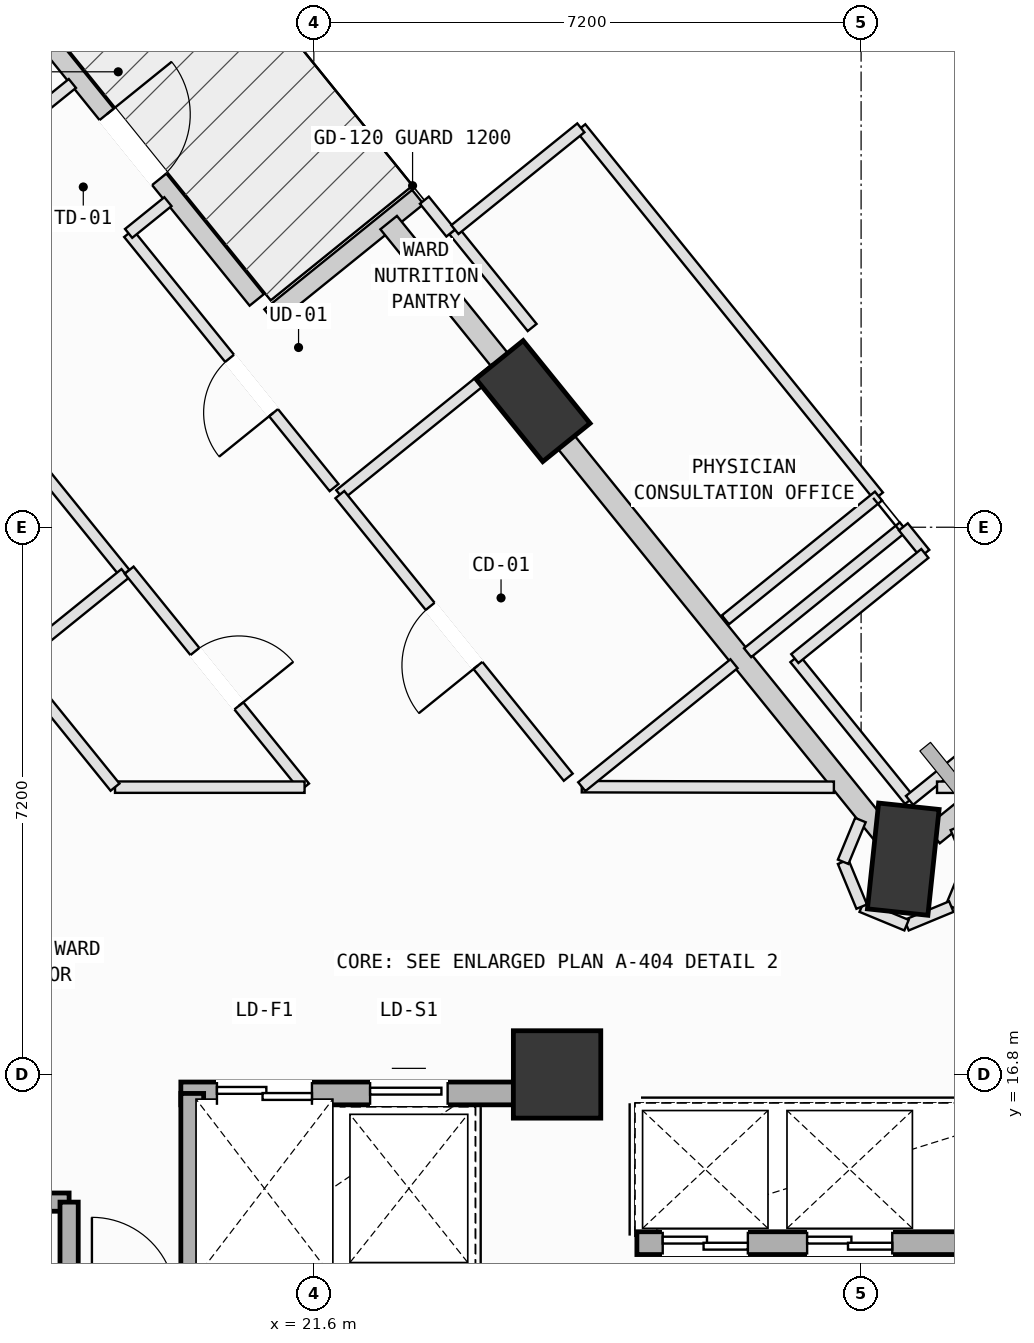
"""IFC4 building model, lengths in metres.
Left out: names, types, materials, properties, quantities, classifications, styles, units other than length and angle.
Written with IfcOpenShell. Run it as: python <this file> out.ifc"""

import sys

from ifc_helpers import new_model, si_unit, direction, frame, frame_2d, origin, origin_2d, place, context, subcontext, project, spatial, rectangle, extrude, element, fill, save


model = new_model("IFC4")
c1 = context("Model", 3, precision=1e-05, world=origin(), true_north=direction((0.0, 1.0)))
c2 = subcontext(c1, "Body", "Model", "MODEL_VIEW")
j1 = project(units=[si_unit("LENGTHUNIT", "METRE"), si_unit("PLANEANGLEUNIT", "RADIAN")], contexts=[c1])
p1 = place(None, origin())
s1 = spatial("IfcSite", under=j1, at=p1, CompositionType="ELEMENT")
p2 = place(p1, origin())
s2 = spatial("IfcBuilding", under=s1, at=p2, CompositionType="ELEMENT")
p3 = place(p2, frame((0.0, 0.0, 189.8)))
s3 = spatial("IfcBuildingStorey", under=s2, at=p3, CompositionType="ELEMENT", Elevation=189.8)
p4 = place(p3, frame((24.8, 16.8, 0.0), z_axis=(0.0, 0.0, 1.0), x_axis=(1.0, 0.0, 0.0)))
e1 = element("IfcColumn", 1, at=p4, inside=s3, PredefinedType="COLUMN", context=c2, shape_type="SweptSolid", body=[
    extrude(rectangle(XDim=1.15, YDim=1.15, at=origin_2d()), origin(), (0.0, 0.0, 1.0), 4.0),
])
p5 = place(p3, frame((29.355, 19.633, 0.002), z_axis=(0.021556852315, -0.017465325105, 0.999615058179), x_axis=(-0.70601495746, 0.707659307079, 0.027589580415)))
e2 = element("IfcColumn", 2, at=p5, inside=s3, PredefinedType="COLUMN", context=c2, shape_type="SweptSolid", body=[
    extrude(rectangle(XDim=1.4, YDim=0.8, at=origin_2d()), origin(), (0.0, 0.0, 1.0), 3.998),
])
p6 = place(p3, frame((24.483, 25.66, 0.002), z_axis=(-0.003235498094, -0.037788175848, 0.999280533843), x_axis=(-0.560052946026, 0.827931598079, 0.029495195374)))
e3 = element("IfcColumn", 3, at=p6, inside=s3, PredefinedType="COLUMN", context=c2, shape_type="SweptSolid", body=[
    extrude(rectangle(XDim=1.4, YDim=0.8, at=origin_2d()), origin(), (0.0, 0.0, 1.0), 3.999),
])
p7 = place(p3, frame((16.473, 32.403, 0.0), z_axis=(0.0, 0.0, 1.0), x_axis=(0.628648132711, -0.777689864431, 0.0)))
e4 = element("IfcWall", 4, at=p7, inside=s3, PredefinedType="SOLIDWALL", context=c2, shape_type="SweptSolid", body=[
    extrude(rectangle(XDim=6.96, YDim=0.24, at=frame_2d((3.48, 0.0))), origin(), (0.0, 0.0, 1.0), 3.265),
])
p8 = place(p7, frame((3.82, 0.0, 0.0)))
e5 = element("IfcOpeningElement", 5, at=p8, cuts=e4, PredefinedType="OPENING", context=c2, shape_type="SweptSolid", body=[
    extrude(rectangle(XDim=1.1, YDim=2.15, at=frame_2d((0.55, 1.075))), frame((0.0, 0.13, 0.0), z_axis=(0.0, -1.0, 0.0), x_axis=(1.0, 0.0, 0.0)), (0.0, 0.0, 1.0), 0.26),
])
p9 = place(p3, frame((21.024, 26.773, 0.0), z_axis=(0.0, 0.0, 1.0), x_axis=(0.777638153774, 0.628712097701, 0.0)))
e6 = element("IfcWall", 6, at=p9, inside=s3, PredefinedType="SOLIDWALL", context=c2, shape_type="SweptSolid", body=[
    extrude(rectangle(XDim=2.5, YDim=0.24, at=frame_2d((1.25, 0.0))), origin(), (0.0, 0.0, 1.0), 3.265),
])
p10 = place(p3, frame((29.747, 19.95, 0.0), z_axis=(0.0, 0.0, 1.0), x_axis=(0.777717798176, 0.628613574782, 0.0)))
e7 = element("IfcWall", 7, at=p10, inside=s3, PredefinedType="SOLIDWALL", context=c2, shape_type="SweptSolid", body=[
    extrude(rectangle(XDim=5.96, YDim=0.28, at=frame_2d((2.98, 0.0))), origin(), (0.0, 0.0, 1.0), 3.265),
])
p11 = place(p3, frame((29.077, 19.976, 0.0), z_axis=(0.0, 0.0, 1.0), x_axis=(-0.628642221387, 0.777694642832, 0.0)))
e8 = element("IfcWall", 8, at=p11, inside=s3, PredefinedType="SOLIDWALL", context=c2, shape_type="SweptSolid", body=[
    extrude(rectangle(XDim=6.76, YDim=0.28, at=frame_2d((3.38, 0.0))), origin(), (0.0, 0.0, 1.0), 3.265),
])
p12 = place(p3, frame((24.207, 26.001, 0.0), z_axis=(0.0, 0.0, 1.0), x_axis=(-0.628643052837, 0.777693970736, 0.0)))
e9 = element("IfcWall", 9, at=p12, inside=s3, PredefinedType="SOLIDWALL", context=c2, shape_type="SweptSolid", body=[
    extrude(rectangle(XDim=2.582, YDim=0.28, at=frame_2d((1.291, 0.0))), origin(), (0.0, 0.0, 1.0), 3.245),
])
p13 = place(p3, frame((14.92, 15.12, 0.0), z_axis=(0.0, 0.0, 1.0), x_axis=(1.0, 0.0, 0.0)))
e10 = element("IfcWall", 10, at=p13, inside=s3, PredefinedType="SOLIDWALL", context=c2, shape_type="SweptSolid", body=[
    extrude(rectangle(XDim=3.46, YDim=0.24, at=frame_2d((1.73, 0.0))), origin(), (0.0, 0.0, 1.0), 3.78),
])
p14 = place(p13, frame((0.22, 0.0, 0.0)))
e11 = element("IfcOpeningElement", 11, at=p14, cuts=e10, PredefinedType="OPENING", context=c2, shape_type="SweptSolid", body=[
    extrude(rectangle(XDim=1.1, YDim=2.15, at=frame_2d((0.55, 1.075))), frame((0.0, 0.13, 0.0), z_axis=(0.0, -1.0, 0.0), x_axis=(1.0, 0.0, 0.0)), (0.0, 0.0, 1.0), 0.26),
])
p15 = place(p3, frame((18.38, 15.12, 0.0), z_axis=(0.0, 0.0, 1.0), x_axis=(0.0, -1.0, 0.0)))
e12 = element("IfcWall", 12, at=p15, inside=s3, PredefinedType="SOLIDWALL", context=c2, shape_type="SweptSolid", body=[
    extrude(rectangle(XDim=7.045, YDim=0.24, at=frame_2d((3.522, 0.0))), origin(), (0.0, 0.0, 1.0), 3.78),
])
p16 = place(p3, frame((19.85, 16.55, 0.0), z_axis=(0.0, 0.0, 1.0), x_axis=(1.0, 0.0, 0.0)))
e13 = element("IfcWall", 13, at=p16, inside=s3, PredefinedType="SOLIDWALL", context=c2, shape_type="SweptSolid", body=[
    extrude(rectangle(XDim=4.375, YDim=0.3, at=frame_2d((2.188, 0.0))), origin(), (0.0, 0.0, 1.0), 3.78),
])
p17 = place(p16, frame((0.475, 0.0, 0.0)))
e14 = element("IfcOpeningElement", 14, at=p17, cuts=e13, PredefinedType="OPENING", context=c2, shape_type="SweptSolid", body=[
    extrude(rectangle(XDim=1.25, YDim=2.18, at=frame_2d((0.625, 1.09))), frame((0.0, 0.16, 0.0), z_axis=(0.0, -1.0, 0.0), x_axis=(1.0, 0.0, 0.0)), (0.0, 0.0, 1.0), 0.32),
])
p18 = place(p16, frame((2.49, 0.0, 0.0)))
e15 = element("IfcOpeningElement", 15, at=p18, cuts=e13, PredefinedType="OPENING", context=c2, shape_type="SweptSolid", body=[
    extrude(rectangle(XDim=1.02, YDim=2.12, at=frame_2d((0.51, 1.06))), frame((0.0, 0.16, 0.0), z_axis=(0.0, -1.0, 0.0), x_axis=(1.0, 0.0, 0.0)), (0.0, 0.0, 1.0), 0.32),
])
p19 = place(p3, frame((20.0, 13.82, 0.0), z_axis=(0.0, 0.0, 1.0), x_axis=(0.0, 1.0, 0.0)))
e16 = element("IfcWall", 16, at=p19, inside=s3, PredefinedType="SOLIDWALL", context=c2, shape_type="SweptSolid", body=[
    extrude(rectangle(XDim=2.73, YDim=0.3, at=frame_2d((1.365, 0.0))), origin(), (0.0, 0.0, 1.0), 3.78),
])
p20 = place(p3, frame((25.85, 14.58, 0.0), z_axis=(0.0, 0.0, 1.0), x_axis=(1.0, 0.0, 0.0)))
e17 = element("IfcWall", 17, at=p20, inside=s3, PredefinedType="SOLIDWALL", context=c2, shape_type="SweptSolid", body=[
    extrude(rectangle(XDim=5.45, YDim=0.3, at=frame_2d((2.725, 0.0))), origin(), (0.0, 0.0, 1.0), 3.78),
])
p21 = place(p20, frame((0.34, 0.0, 0.0)))
e18 = element("IfcOpeningElement", 18, at=p21, cuts=e17, PredefinedType="OPENING", context=c2, shape_type="SweptSolid", body=[
    extrude(rectangle(XDim=1.12, YDim=2.15, at=frame_2d((0.56, 1.075))), frame((0.0, 0.16, 0.0), z_axis=(0.0, -1.0, 0.0), x_axis=(1.0, 0.0, 0.0)), (0.0, 0.0, 1.0), 0.32),
])
p22 = place(p20, frame((2.24, 0.0, 0.0)))
e19 = element("IfcOpeningElement", 19, at=p22, cuts=e17, PredefinedType="OPENING", context=c2, shape_type="SweptSolid", body=[
    extrude(rectangle(XDim=1.12, YDim=2.15, at=frame_2d((0.56, 1.075))), frame((0.0, 0.16, 0.0), z_axis=(0.0, -1.0, 0.0), x_axis=(1.0, 0.0, 0.0)), (0.0, 0.0, 1.0), 0.32),
])
p23 = place(p3, frame((14.061, 29.644, 0.0), z_axis=(0.0, 0.0, 1.0), x_axis=(0.628674878408, -0.777668243699, 0.0)))
e20 = element("IfcWall", 20, at=p23, inside=s3, PredefinedType="PARTITIONING", context=c2, shape_type="SweptSolid", body=[
    extrude(rectangle(XDim=8.041, YDim=0.15, at=frame_2d((4.02, 0.0))), origin(), (0.0, 0.0, 1.0), 3.78),
])
p24 = place(p23, frame((3.42, 0.0, 0.0)))
e21 = element("IfcOpeningElement", 21, at=p24, cuts=e20, PredefinedType="OPENING", context=c2, shape_type="SweptSolid", body=[
    extrude(rectangle(XDim=1.2, YDim=2.15, at=frame_2d((0.6, 1.075))), frame((0.0, 0.085, 0.0), z_axis=(0.0, -1.0, 0.0), x_axis=(1.0, 0.0, 0.0)), (0.0, 0.0, 1.0), 0.17),
])
p25 = place(p3, frame((19.116, 23.391, 0.0), z_axis=(0.0, 0.0, 1.0), x_axis=(-0.777737917083, -0.628588682949, 0.0)))
e22 = element("IfcWall", 22, at=p25, inside=s3, PredefinedType="PARTITIONING", context=c2, shape_type="SweptSolid", body=[
    extrude(rectangle(XDim=4.472, YDim=0.15, at=frame_2d((2.236, 0.0))), origin(), (0.0, 0.0, 1.0), 3.78),
])
p26 = place(p3, frame((27.928, 22.272, 0.0), z_axis=(0.0, 0.0, 1.0), x_axis=(0.628817696096, -0.777552766747, 0.0)))
e23 = element("IfcWall", 23, at=p26, inside=s3, PredefinedType="PARTITIONING", context=c2, shape_type="SweptSolid", body=[
    extrude(rectangle(XDim=2.4, YDim=0.15, at=frame_2d((1.2, 0.0))), origin(), (0.0, 0.0, 1.0), 3.78),
])
p27 = place(p3, frame((29.437, 20.406, 0.0), z_axis=(0.0, 0.0, 1.0), x_axis=(0.777692568026, 0.628644788125, 0.0)))
e24 = element("IfcWall", 24, at=p27, inside=s3, PredefinedType="PARTITIONING", context=c2, shape_type="SweptSolid", body=[
    extrude(rectangle(XDim=6.944, YDim=0.15, at=frame_2d((3.472, 0.0))), origin(), (0.0, 0.0, 1.0), 3.78),
])
p28 = place(p3, frame((30.343, 20.579, 0.0), z_axis=(0.0, 0.0, 1.0), x_axis=(-1.0, 0.0, 0.0)))
e25 = element("IfcWall", 25, at=p28, inside=s3, PredefinedType="PARTITIONING", context=c2, shape_type="SweptSolid", body=[
    extrude(rectangle(XDim=0.544, YDim=0.15, at=frame_2d((0.272, 0.0))), origin(), (0.0, 0.0, 1.0), 3.78),
])
p29 = place(p3, frame((30.047, 20.044, 0.0), z_axis=(0.0, 0.0, 1.0), x_axis=(0.382783485813, -0.923838082669, 0.0)))
e26 = element("IfcWall", 26, at=p29, inside=s3, PredefinedType="PARTITIONING", context=c2, shape_type="SweptSolid", body=[
    extrude(rectangle(XDim=0.483, YDim=0.15, at=frame_2d((0.241, 0.0))), origin(), (0.0, 0.0, 1.0), 3.78),
])
p30 = place(p3, frame((30.232, 19.598, 0.0), z_axis=(0.0, 0.0, 1.0), x_axis=(-0.383420739437, -0.923573785125, 0.0)))
e27 = element("IfcWall", 27, at=p30, inside=s3, PredefinedType="PARTITIONING", context=c2, shape_type="SweptSolid", body=[
    extrude(rectangle(XDim=0.639, YDim=0.15, at=frame_2d((0.319, 0.0))), origin(), (0.0, 0.0, 1.0), 3.78),
])
p31 = place(p3, frame((29.987, 19.008, 0.0), z_axis=(0.0, 0.0, 1.0), x_axis=(-0.923811477415, -0.382847690599, 0.0)))
e28 = element("IfcWall", 28, at=p31, inside=s3, PredefinedType="PARTITIONING", context=c2, shape_type="SweptSolid", body=[
    extrude(rectangle(XDim=0.638, YDim=0.15, at=frame_2d((0.319, 0.0))), origin(), (0.0, 0.0, 1.0), 3.415),
])
for number, where, z_axis, x_axis in (
    (29, (29.398, 18.764, 0.0), (0.0, 0.0, 1.0), (-0.924, 0.382, 0.0)),
    (30, (28.808, 19.008, 0.0), (0.0, 0.0, 1.0), (-0.382, 0.924, 0.0)),
):
    element("IfcWall", number, at=place(p3, frame(where, z_axis=z_axis, x_axis=x_axis)), inside=s3, PredefinedType="PARTITIONING", context=c2, shape_type="SweptSolid", body=[
        extrude(rectangle(XDim=0.638, YDim=0.15, at=frame_2d((0.319, 0.0))), origin(), (0.0, 0.0, 1.0), 3.78),
    ])
p32 = place(p3, frame((28.564, 19.598, 0.0), z_axis=(0.0, 0.0, 1.0), x_axis=(0.382134027661, 0.924106912053, 0.0)))
e31 = element("IfcWall", 31, at=p32, inside=s3, PredefinedType="PARTITIONING", context=c2, shape_type="SweptSolid", body=[
    extrude(rectangle(XDim=0.594, YDim=0.15, at=frame_2d((0.297, 0.0))), origin(), (0.0, 0.0, 1.0), 3.78),
])
p33 = place(p3, frame((28.442, 20.579, 0.0), z_axis=(0.0, 0.0, 1.0), x_axis=(-0.999997876259, 0.002060940714, 0.0)))
e32 = element("IfcWall", 32, at=p33, inside=s3, PredefinedType="PARTITIONING", context=c2, shape_type="SweptSolid", body=[
    extrude(rectangle(XDim=3.317, YDim=0.15, at=frame_2d((1.658, 0.0))), origin(), (0.0, 0.0, 1.0), 3.78),
])
p34 = place(p3, frame((25.125, 20.586, 0.0), z_axis=(0.0, 0.0, 1.0), x_axis=(0.777862741632, 0.62843420911, 0.0)))
e33 = element("IfcWall", 33, at=p34, inside=s3, PredefinedType="PARTITIONING", context=c2, shape_type="SweptSolid", body=[
    extrude(rectangle(XDim=2.575, YDim=0.15, at=frame_2d((1.288, 0.0))), origin(), (0.0, 0.0, 1.0), 3.78),
])
p35 = place(p3, frame((27.307, 22.349, 0.0), z_axis=(0.0, 0.0, 1.0), x_axis=(0.777803521149, 0.628507503924, 0.0)))
e34 = element("IfcWall", 34, at=p35, inside=s3, PredefinedType="PARTITIONING", context=c2, shape_type="SweptSolid", body=[
    extrude(rectangle(XDim=2.635, YDim=0.15, at=frame_2d((1.317, 0.0))), origin(), (0.0, 0.0, 1.0), 3.78),
])
p36 = place(p3, frame((29.356, 24.005, 0.0), z_axis=(0.0, 0.0, 1.0), x_axis=(0.628854778526, -0.77752277621, 0.0)))
e35 = element("IfcWall", 35, at=p36, inside=s3, PredefinedType="PARTITIONING", context=c2, shape_type="SweptSolid", body=[
    extrude(rectangle(XDim=0.45, YDim=0.15, at=frame_2d((0.225, 0.0))), origin(), (0.0, 0.0, 1.0), 3.78),
])
p37 = place(p3, frame((29.639, 23.655, 0.0), z_axis=(0.0, 0.0, 1.0), x_axis=(-0.777686587847, -0.628652186095, 0.0)))
e36 = element("IfcWall", 36, at=p37, inside=s3, PredefinedType="PARTITIONING", context=c2, shape_type="SweptSolid", body=[
    extrude(rectangle(XDim=2.2, YDim=0.15, at=frame_2d((1.1, 0.0))), origin(), (0.0, 0.0, 1.0), 3.78),
])
p38 = place(p3, frame((21.942, 24.429, 0.0), z_axis=(0.0, 0.0, 1.0), x_axis=(0.777758218132, 0.628563564111, 0.0)))
e37 = element("IfcWall", 37, at=p38, inside=s3, PredefinedType="PARTITIONING", context=c2, shape_type="SweptSolid", body=[
    extrude(rectangle(XDim=2.635, YDim=0.15, at=frame_2d((1.317, 0.0))), origin(), (0.0, 0.0, 1.0), 3.78),
])
p39 = place(p3, frame((24.947, 20.711, 0.0), z_axis=(0.0, 0.0, 1.0), x_axis=(-0.628604529082, 0.777725109545, 0.0)))
e38 = element("IfcWall", 38, at=p39, inside=s3, PredefinedType="PARTITIONING", context=c2, shape_type="SweptSolid", body=[
    extrude(rectangle(XDim=4.781, YDim=0.15, at=frame_2d((2.39, 0.0))), origin(), (0.0, 0.0, 1.0), 3.415),
])
p40 = place(p39, frame((1.89, 0.0, 0.0)))
e39 = element("IfcOpeningElement", 39, at=p40, cuts=e38, PredefinedType="OPENING", context=c2, shape_type="SweptSolid", body=[
    extrude(rectangle(XDim=1.0, YDim=2.12, at=frame_2d((0.5, 1.06))), frame((0.0, 0.085, 0.0), z_axis=(0.0, -1.0, 0.0), x_axis=(1.0, 0.0, 0.0)), (0.0, 0.0, 1.0), 0.17),
])
p41 = place(p3, frame((23.441, 27.903, 0.0), z_axis=(0.0, 0.0, 1.0), x_axis=(0.628735558249, -0.777619185587, 0.0)))
e40 = element("IfcWall", 40, at=p41, inside=s3, PredefinedType="PARTITIONING", context=c2, shape_type="SweptSolid", body=[
    extrude(rectangle(XDim=1.64, YDim=0.15, at=frame_2d((0.82, 0.0))), origin(), (0.0, 0.0, 1.0), 3.78),
])
p42 = place(p3, frame((21.866, 24.522, 0.0), z_axis=(0.0, 0.0, 1.0), x_axis=(-0.628613292598, 0.777718026259, 0.0)))
e41 = element("IfcWall", 41, at=p42, inside=s3, PredefinedType="PARTITIONING", context=c2, shape_type="SweptSolid", body=[
    extrude(rectangle(XDim=4.3, YDim=0.15, at=frame_2d((2.15, 0.0))), origin(), (0.0, 0.0, 1.0), 3.78),
])
p43 = place(p42, frame((1.267, 0.0, 0.0)))
e42 = element("IfcOpeningElement", 42, at=p43, cuts=e41, PredefinedType="OPENING", context=c2, shape_type="SweptSolid", body=[
    extrude(rectangle(XDim=0.92, YDim=2.1, at=frame_2d((0.46, 1.05))), frame((0.0, 0.085, 0.0), z_axis=(0.0, -1.0, 0.0), x_axis=(1.0, 0.0, 0.0)), (0.0, 0.0, 1.0), 0.17),
])
p44 = place(p3, frame((19.163, 27.866, 0.0), z_axis=(0.0, 0.0, 1.0), x_axis=(0.777561248939, 0.628807207456, 0.0)))
e43 = element("IfcWall", 43, at=p44, inside=s3, PredefinedType="PARTITIONING", context=c2, shape_type="SweptSolid", body=[
    extrude(rectangle(XDim=0.665, YDim=0.15, at=frame_2d((0.333, 0.0))), origin(), (0.0, 0.0, 1.0), 3.78),
])
p45 = place(p3, frame((23.054, 28.303, 0.0), z_axis=(0.0, 0.0, 1.0), x_axis=(0.628449940724, -0.777850031821, 0.0)))
e44 = element("IfcWall", 44, at=p45, inside=s3, PredefinedType="PARTITIONING", context=c2, shape_type="SweptSolid", body=[
    extrude(rectangle(XDim=0.554, YDim=0.15, at=frame_2d((0.277, 0.0))), origin(), (0.0, 0.0, 1.0), 3.78),
])
p46 = place(p3, frame((18.423, 29.839, 0.0), z_axis=(0.0, 0.0, 1.0), x_axis=(-0.77752690972, -0.628849667776, 0.0)))
e45 = element("IfcWall", 45, at=p46, inside=s3, PredefinedType="PARTITIONING", context=c2, shape_type="SweptSolid", body=[
    extrude(rectangle(XDim=0.665, YDim=0.15, at=frame_2d((0.333, 0.0))), origin(), (0.0, 0.0, 1.0), 3.78),
])
p47 = place(p3, frame((19.17, 23.435, 0.0), z_axis=(0.0, 0.0, 1.0), x_axis=(0.62869305857, -0.777653546321, 0.0)))
e46 = element("IfcWall", 46, at=p47, inside=s3, PredefinedType="PARTITIONING", context=c2, shape_type="SweptSolid", body=[
    extrude(rectangle(XDim=3.671, YDim=0.15, at=frame_2d((1.836, 0.0))), origin(), (0.0, 0.0, 1.0), 3.78),
])
p48 = place(p47, frame((1.375, 0.0, 0.0)))
e47 = element("IfcOpeningElement", 47, at=p48, cuts=e46, PredefinedType="OPENING", context=c2, shape_type="SweptSolid", body=[
    extrude(rectangle(XDim=0.92, YDim=2.1, at=frame_2d((0.46, 1.05))), frame((0.0, 0.085, 0.0), z_axis=(0.0, -1.0, 0.0), x_axis=(1.0, 0.0, 0.0)), (0.0, 0.0, 1.0), 0.17),
])
p49 = place(p3, frame((21.478, 20.58, 0.0), z_axis=(0.0, 0.0, 1.0), x_axis=(-1.0, 0.0, 0.0)))
e48 = element("IfcWall", 48, at=p49, inside=s3, PredefinedType="PARTITIONING", context=c2, shape_type="SweptSolid", body=[
    extrude(rectangle(XDim=2.494, YDim=0.15, at=frame_2d((1.247, 0.0))), origin(), (0.0, 0.0, 1.0), 3.78),
])
p50 = place(p3, frame((18.984, 20.58, 0.0), z_axis=(0.0, 0.0, 1.0), x_axis=(-0.628759845398, 0.777599547849, 0.0)))
e49 = element("IfcWall", 49, at=p50, inside=s3, PredefinedType="PARTITIONING", context=c2, shape_type="SweptSolid", body=[
    extrude(rectangle(XDim=2.083, YDim=0.15, at=frame_2d((1.042, 0.0))), origin(), (0.0, 0.0, 1.0), 3.78),
])
p51 = place(p3, frame((25.113, 29.255, 0.0), z_axis=(0.0, 0.0, 1.0), x_axis=(0.628606171211, -0.777723782275, 0.0)))
e50 = element("IfcWall", 50, at=p51, inside=s3, PredefinedType="PARTITIONING", context=c2, shape_type="SweptSolid", body=[
    extrude(rectangle(XDim=6.23, YDim=0.15, at=frame_2d((3.115, 0.0))), origin(), (0.0, 0.0, 1.0), 3.78),
])
p52 = place(p3, frame((29.029, 24.41, 0.0), z_axis=(0.0, 0.0, 1.0), x_axis=(-0.777732003351, -0.628595999799, 0.0)))
e51 = element("IfcWall", 51, at=p52, inside=s3, PredefinedType="PARTITIONING", context=c2, shape_type="SweptSolid", body=[
    extrude(rectangle(XDim=2.59, YDim=0.15, at=frame_2d((1.295, 0.0))), origin(), (0.0, 0.0, 1.0), 3.78),
])
p53 = place(p3, frame((23.456, 27.916, 0.0), z_axis=(0.0, 0.0, 1.0), x_axis=(0.777818353199, 0.628489148217, 0.0)))
e52 = element("IfcWall", 52, at=p53, inside=s3, PredefinedType="PARTITIONING", context=c2, shape_type="SweptSolid", body=[
    extrude(rectangle(XDim=2.13, YDim=0.15, at=frame_2d((1.065, 0.0))), origin(), (0.0, 0.0, 1.0), 3.78),
])
p54 = place(p8, origin())
e53 = element("IfcDoor", 53, at=p54, inside=s3, OperationType="SINGLE_SWING_LEFT", PredefinedType="DOOR", context=c2, shape_type="SweptSolid", body=[
    extrude(rectangle(XDim=1.1, YDim=2.15, at=frame_2d((0.55, 1.075))), frame((0.0, 0.025, 0.0), z_axis=(0.0, -1.0, 0.0), x_axis=(1.0, 0.0, 0.0)), (0.0, 0.0, 1.0), 0.05),
])
fill(e5, e53)
p55 = place(p21, origin())
e54 = element("IfcDoor", 54, at=p55, inside=s3, OperationType="DOUBLE_DOOR_SLIDING", PredefinedType="DOOR", context=c2, shape_type="SweptSolid", body=[
    extrude(rectangle(XDim=1.12, YDim=2.15, at=frame_2d((0.56, 1.075))), frame((0.0, 0.025, 0.0), z_axis=(0.0, -1.0, 0.0), x_axis=(1.0, 0.0, 0.0)), (0.0, 0.0, 1.0), 0.05),
])
fill(e18, e54)
p56 = place(p22, origin())
e55 = element("IfcDoor", 55, at=p56, inside=s3, OperationType="DOUBLE_DOOR_SLIDING", PredefinedType="DOOR", context=c2, shape_type="SweptSolid", body=[
    extrude(rectangle(XDim=1.12, YDim=2.15, at=frame_2d((0.56, 1.075))), frame((0.0, 0.025, 0.0), z_axis=(0.0, -1.0, 0.0), x_axis=(1.0, 0.0, 0.0)), (0.0, 0.0, 1.0), 0.05),
])
fill(e19, e55)
p57 = place(p17, origin())
e56 = element("IfcDoor", 56, at=p57, inside=s3, OperationType="DOUBLE_DOOR_SLIDING", PredefinedType="DOOR", context=c2, shape_type="SweptSolid", body=[
    extrude(rectangle(XDim=1.25, YDim=2.18, at=frame_2d((0.625, 1.09))), frame((0.0, 0.025, 0.0), z_axis=(0.0, -1.0, 0.0), x_axis=(1.0, 0.0, 0.0)), (0.0, 0.0, 1.0), 0.05),
])
fill(e14, e56)
p58 = place(p18, origin())
e57 = element("IfcDoor", 57, at=p58, inside=s3, OperationType="SLIDING_TO_LEFT", PredefinedType="DOOR", context=c2, shape_type="SweptSolid", body=[
    extrude(rectangle(XDim=1.02, YDim=2.12, at=frame_2d((0.51, 1.06))), frame((0.0, 0.025, 0.0), z_axis=(0.0, -1.0, 0.0), x_axis=(1.0, 0.0, 0.0)), (0.0, 0.0, 1.0), 0.05),
])
fill(e15, e57)
p59 = place(p40, origin())
e58 = element("IfcDoor", 58, at=p59, inside=s3, OperationType="SINGLE_SWING_LEFT", PredefinedType="DOOR", context=c2, shape_type="SweptSolid", body=[
    extrude(rectangle(XDim=1.0, YDim=2.12, at=frame_2d((0.5, 1.06))), frame((0.0, 0.025, 0.0), z_axis=(0.0, -1.0, 0.0), x_axis=(1.0, 0.0, 0.0)), (0.0, 0.0, 1.0), 0.05),
])
fill(e39, e58)
p60 = place(p43, origin())
e59 = element("IfcDoor", 59, at=p60, inside=s3, OperationType="SINGLE_SWING_LEFT", PredefinedType="DOOR", context=c2, shape_type="SweptSolid", body=[
    extrude(rectangle(XDim=0.92, YDim=2.1, at=frame_2d((0.46, 1.05))), frame((0.0, 0.025, 0.0), z_axis=(0.0, -1.0, 0.0), x_axis=(1.0, 0.0, 0.0)), (0.0, 0.0, 1.0), 0.05),
])
fill(e42, e59)
p61 = place(p48, origin())
e60 = element("IfcDoor", 60, at=p61, inside=s3, OperationType="SINGLE_SWING_RIGHT", PredefinedType="DOOR", context=c2, shape_type="SweptSolid", body=[
    extrude(rectangle(XDim=0.92, YDim=2.1, at=frame_2d((0.46, 1.05))), frame((0.0, 0.025, 0.0), z_axis=(0.0, -1.0, 0.0), x_axis=(1.0, 0.0, 0.0)), (0.0, 0.0, 1.0), 0.05),
])
fill(e47, e60)
save(model, sys.argv[1])
